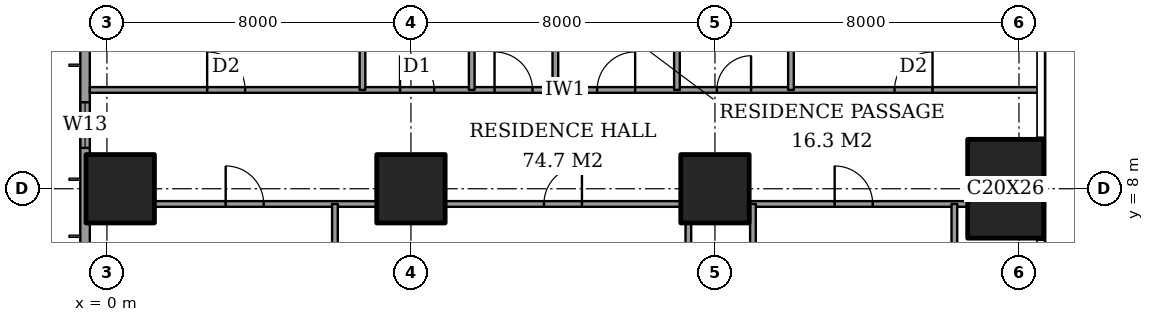
"""IFC4 building model, lengths in metres.
Left out: names, types, materials, properties, quantities, classifications, styles, units other than length and angle.
Written with IfcOpenShell. Run it as: python <this file> out.ifc"""

import sys

from ifc_helpers import new_model, si_unit, direction, frame, frame_2d, origin, origin_2d, place, context, subcontext, project, spatial, rectangle, extrude, element, fill, save


model = new_model("IFC4")
c1 = context("Model", 3, precision=1e-05, world=origin(), true_north=direction((0.0, 1.0)))
c2 = subcontext(c1, "Body", "Model", "MODEL_VIEW")
j1 = project(units=[si_unit("LENGTHUNIT", "METRE"), si_unit("PLANEANGLEUNIT", "RADIAN")], contexts=[c1])
p1 = place(None, origin())
s1 = spatial("IfcSite", under=j1, at=p1, CompositionType="ELEMENT")
p2 = place(p1, origin())
s2 = spatial("IfcBuilding", under=s1, at=p2, CompositionType="ELEMENT")
p3 = place(p2, frame((0.0, 0.0, 189.4)))
s3 = spatial("IfcBuildingStorey", under=s2, at=p3, CompositionType="ELEMENT", Elevation=189.4)
for number, where, z_axis, x_axis in (
    (1, (0.35, 8.0, 0.0), (0.0, 0.0, 1.0), (1.0, 0.0, 0.0)),
    (2, (8.0, 8.0, 0.0), (0.0, 0.0, 1.0), (1.0, 0.0, 0.0)),
    (3, (16.0, 8.0, 0.0), (0.0, 0.0, 1.0), (1.0, 0.0, 0.0)),
):
    element("IfcColumn", number, at=place(p3, frame(where, z_axis=z_axis, x_axis=x_axis)), inside=s3, PredefinedType="COLUMN", context=c2, shape_type="SweptSolid", body=[
        extrude(rectangle(XDim=1.8, YDim=1.8, at=origin_2d()), origin(), (0.0, 0.0, 1.0), 3.6),
    ])
p4 = place(p3, frame((23.65, 8.0, 0.0), z_axis=(0.0, 0.0, 1.0), x_axis=(1.0, 0.0, 0.0)))
e4 = element("IfcColumn", 4, at=p4, inside=s3, PredefinedType="COLUMN", context=c2, shape_type="SweptSolid", body=[
    extrude(rectangle(XDim=2.0, YDim=2.6, at=origin_2d()), origin(), (0.0, 0.0, 1.0), 3.6),
])
p5 = place(p3, frame((-0.575, 44.825, 0.0), z_axis=(0.0, 0.0, 1.0), x_axis=(0.0, -1.0, 0.0)))
e5 = element("IfcWall", 5, at=p5, inside=s3, PredefinedType="SOLIDWALL", context=c2, shape_type="SweptSolid", body=[
    extrude(rectangle(XDim=41.65, YDim=0.25, at=frame_2d((20.825, 0.0))), origin(), (0.0, 0.0, 1.0), 3.6),
])
p6 = place(p5, frame((0.825, 0.0, 0.2)))
e6 = element("IfcOpeningElement", 6, at=p6, cuts=e5, PredefinedType="OPENING", context=c2, shape_type="SweptSolid", body=[
    extrude(rectangle(XDim=2.4, YDim=2.4, at=frame_2d((1.2, 1.2))), frame((0.0, 0.135, 0.0), z_axis=(0.0, -1.0, 0.0), x_axis=(1.0, 0.0, 0.0)), (0.0, 0.0, 1.0), 0.27),
])
p7 = place(p5, frame((6.05, 0.0, 0.2)))
e7 = element("IfcOpeningElement", 7, at=p7, cuts=e5, PredefinedType="OPENING", context=c2, shape_type="SweptSolid", body=[
    extrude(rectangle(XDim=1.2, YDim=2.4, at=frame_2d((0.6, 1.2))), frame((0.0, 0.135, 0.0), z_axis=(0.0, -1.0, 0.0), x_axis=(1.0, 0.0, 0.0)), (0.0, 0.0, 1.0), 0.27),
])
p8 = place(p5, frame((8.475, 0.0, 0.2)))
e8 = element("IfcOpeningElement", 8, at=p8, cuts=e5, PredefinedType="OPENING", context=c2, shape_type="SweptSolid", body=[
    extrude(rectangle(XDim=2.4, YDim=2.4, at=frame_2d((1.2, 1.2))), frame((0.0, 0.135, 0.0), z_axis=(0.0, -1.0, 0.0), x_axis=(1.0, 0.0, 0.0)), (0.0, 0.0, 1.0), 0.27),
])
p9 = place(p5, frame((15.625, 0.0, 0.2)))
e9 = element("IfcOpeningElement", 9, at=p9, cuts=e5, PredefinedType="OPENING", context=c2, shape_type="SweptSolid", body=[
    extrude(rectangle(XDim=2.4, YDim=2.4, at=frame_2d((1.2, 1.2))), frame((0.0, 0.135, 0.0), z_axis=(0.0, -1.0, 0.0), x_axis=(1.0, 0.0, 0.0)), (0.0, 0.0, 1.0), 0.27),
])
p10 = place(p5, frame((23.625, 0.0, 0.2)))
e10 = element("IfcOpeningElement", 10, at=p10, cuts=e5, PredefinedType="OPENING", context=c2, shape_type="SweptSolid", body=[
    extrude(rectangle(XDim=2.4, YDim=2.4, at=frame_2d((1.2, 1.2))), frame((0.0, 0.135, 0.0), z_axis=(0.0, -1.0, 0.0), x_axis=(1.0, 0.0, 0.0)), (0.0, 0.0, 1.0), 0.27),
])
p11 = place(p5, frame((30.775, 0.0, 0.2)))
e11 = element("IfcOpeningElement", 11, at=p11, cuts=e5, PredefinedType="OPENING", context=c2, shape_type="SweptSolid", body=[
    extrude(rectangle(XDim=2.4, YDim=2.4, at=frame_2d((1.2, 1.2))), frame((0.0, 0.135, 0.0), z_axis=(0.0, -1.0, 0.0), x_axis=(1.0, 0.0, 0.0)), (0.0, 0.0, 1.0), 0.27),
])
p12 = place(p5, frame((34.55, 0.0, 0.2)))
e12 = element("IfcOpeningElement", 12, at=p12, cuts=e5, PredefinedType="OPENING", context=c2, shape_type="SweptSolid", body=[
    extrude(rectangle(XDim=1.2, YDim=2.4, at=frame_2d((0.6, 1.2))), frame((0.0, 0.135, 0.0), z_axis=(0.0, -1.0, 0.0), x_axis=(1.0, 0.0, 0.0)), (0.0, 0.0, 1.0), 0.27),
])
p13 = place(p5, frame((38.425, 0.0, 0.2)))
e13 = element("IfcOpeningElement", 13, at=p13, cuts=e5, PredefinedType="OPENING", context=c2, shape_type="SweptSolid", body=[
    extrude(rectangle(XDim=2.4, YDim=2.4, at=frame_2d((1.2, 1.2))), frame((0.0, 0.135, 0.0), z_axis=(0.0, -1.0, 0.0), x_axis=(1.0, 0.0, 0.0)), (0.0, 0.0, 1.0), 0.27),
])
p14 = place(p3, frame((1.25, 7.6, 0.0), z_axis=(0.0, 0.0, 1.0), x_axis=(1.0, 0.0, 0.0)))
e14 = element("IfcWall", 14, at=p14, inside=s3, PredefinedType="PARTITIONING", context=c2, shape_type="SweptSolid", body=[
    extrude(rectangle(XDim=5.85, YDim=0.15, at=frame_2d((2.925, 0.0))), origin(), (0.0, 0.0, 1.0), 3.35),
])
p15 = place(p14, frame((1.875, 0.0, 0.0)))
e15 = element("IfcOpeningElement", 15, at=p15, cuts=e14, PredefinedType="OPENING", context=c2, shape_type="SweptSolid", body=[
    extrude(rectangle(XDim=1.0, YDim=2.1, at=frame_2d((0.5, 1.05))), frame((0.0, 0.085, 0.0), z_axis=(0.0, -1.0, 0.0), x_axis=(1.0, 0.0, 0.0)), (0.0, 0.0, 1.0), 0.17),
])
p16 = place(p3, frame((8.9, 7.6, 0.0), z_axis=(0.0, 0.0, 1.0), x_axis=(1.0, 0.0, 0.0)))
e16 = element("IfcWall", 16, at=p16, inside=s3, PredefinedType="PARTITIONING", context=c2, shape_type="SweptSolid", body=[
    extrude(rectangle(XDim=6.2, YDim=0.15, at=frame_2d((3.1, 0.0))), origin(), (0.0, 0.0, 1.0), 3.35),
])
p17 = place(p16, frame((2.6, 0.0, 0.0)))
e17 = element("IfcOpeningElement", 17, at=p17, cuts=e16, PredefinedType="OPENING", context=c2, shape_type="SweptSolid", body=[
    extrude(rectangle(XDim=1.0, YDim=2.1, at=frame_2d((0.5, 1.05))), frame((0.0, 0.085, 0.0), z_axis=(0.0, -1.0, 0.0), x_axis=(1.0, 0.0, 0.0)), (0.0, 0.0, 1.0), 0.17),
])
p18 = place(p3, frame((16.9, 7.6, 0.0), z_axis=(0.0, 0.0, 1.0), x_axis=(1.0, 0.0, 0.0)))
e18 = element("IfcWall", 18, at=p18, inside=s3, PredefinedType="PARTITIONING", context=c2, shape_type="SweptSolid", body=[
    extrude(rectangle(XDim=5.75, YDim=0.15, at=frame_2d((2.875, 0.0))), origin(), (0.0, 0.0, 1.0), 3.35),
])
p19 = place(p18, frame((2.25, 0.0, 0.0)))
e19 = element("IfcOpeningElement", 19, at=p19, cuts=e18, PredefinedType="OPENING", context=c2, shape_type="SweptSolid", body=[
    extrude(rectangle(XDim=1.0, YDim=2.1, at=frame_2d((0.5, 1.05))), frame((0.0, 0.085, 0.0), z_axis=(0.0, -1.0, 0.0), x_axis=(1.0, 0.0, 0.0)), (0.0, 0.0, 1.0), 0.17),
])
p20 = place(p3, frame((-0.45, 10.6, 0.0), z_axis=(0.0, 0.0, 1.0), x_axis=(1.0, 0.0, 0.0)))
e20 = element("IfcWall", 20, at=p20, inside=s3, PredefinedType="PARTITIONING", context=c2, shape_type="SweptSolid", body=[
    extrude(rectangle(XDim=25.011, YDim=0.15, at=frame_2d((12.505, 0.0))), origin(), (0.0, 0.0, 1.0), 3.35),
])
p21 = place(p20, frame((10.65, 0.0, 0.0)))
e21 = element("IfcOpeningElement", 21, at=p21, cuts=e20, PredefinedType="OPENING", context=c2, shape_type="SweptSolid", body=[
    extrude(rectangle(XDim=1.0, YDim=2.1, at=frame_2d((0.5, 1.05))), frame((0.0, 0.085, 0.0), z_axis=(0.0, -1.0, 0.0), x_axis=(1.0, 0.0, 0.0)), (0.0, 0.0, 1.0), 0.17),
])
p22 = place(p20, frame((3.087, 0.0, 0.0)))
e22 = element("IfcOpeningElement", 22, at=p22, cuts=e20, PredefinedType="OPENING", context=c2, shape_type="SweptSolid", body=[
    extrude(rectangle(XDim=1.0, YDim=2.1, at=frame_2d((0.5, 1.05))), frame((0.0, 0.085, 0.0), z_axis=(0.0, -1.0, 0.0), x_axis=(1.0, 0.0, 0.0)), (0.0, 0.0, 1.0), 0.17),
])
p23 = place(p20, frame((8.163, 0.0, 0.0)))
e23 = element("IfcOpeningElement", 23, at=p23, cuts=e20, PredefinedType="OPENING", context=c2, shape_type="SweptSolid", body=[
    extrude(rectangle(XDim=0.9, YDim=2.1, at=frame_2d((0.45, 1.05))), frame((0.0, 0.085, 0.0), z_axis=(0.0, -1.0, 0.0), x_axis=(1.0, 0.0, 0.0)), (0.0, 0.0, 1.0), 0.17),
])
p24 = place(p20, frame((13.35, 0.0, 0.0)))
e24 = element("IfcOpeningElement", 24, at=p24, cuts=e20, PredefinedType="OPENING", context=c2, shape_type="SweptSolid", body=[
    extrude(rectangle(XDim=1.0, YDim=2.1, at=frame_2d((0.5, 1.05))), frame((0.0, 0.085, 0.0), z_axis=(0.0, -1.0, 0.0), x_axis=(1.0, 0.0, 0.0)), (0.0, 0.0, 1.0), 0.17),
])
p25 = place(p20, frame((16.5, 0.0, 0.0)))
e25 = element("IfcOpeningElement", 25, at=p25, cuts=e20, PredefinedType="OPENING", context=c2, shape_type="SweptSolid", body=[
    extrude(rectangle(XDim=0.9, YDim=2.1, at=frame_2d((0.45, 1.05))), frame((0.0, 0.085, 0.0), z_axis=(0.0, -1.0, 0.0), x_axis=(1.0, 0.0, 0.0)), (0.0, 0.0, 1.0), 0.17),
])
p26 = place(p20, frame((21.175, 0.0, 0.0)))
e26 = element("IfcOpeningElement", 26, at=p26, cuts=e20, PredefinedType="OPENING", context=c2, shape_type="SweptSolid", body=[
    extrude(rectangle(XDim=1.0, YDim=2.1, at=frame_2d((0.5, 1.05))), frame((0.0, 0.085, 0.0), z_axis=(0.0, -1.0, 0.0), x_axis=(1.0, 0.0, 0.0)), (0.0, 0.0, 1.0), 0.17),
])
p27 = place(p3, frame((6.0, -0.45, 0.0), z_axis=(0.0, 0.0, 1.0), x_axis=(0.0, 1.0, 0.0)))
e27 = element("IfcWall", 27, at=p27, inside=s3, PredefinedType="PARTITIONING", context=c2, shape_type="SweptSolid", body=[
    extrude(rectangle(XDim=8.05, YDim=0.15, at=frame_2d((4.025, 0.0))), origin(), (0.0, 0.0, 1.0), 3.35),
])
p28 = place(p3, frame((6.725, 10.6, 0.0), z_axis=(0.0, 0.0, 1.0), x_axis=(0.0, 1.0, 0.0)))
e28 = element("IfcWall", 28, at=p28, inside=s3, PredefinedType="PARTITIONING", context=c2, shape_type="SweptSolid", body=[
    extrude(rectangle(XDim=4.2, YDim=0.15, at=frame_2d((2.1, 0.0))), origin(), (0.0, 0.0, 1.0), 3.35),
])
p29 = place(p3, frame((9.6, 10.6, 0.0), z_axis=(0.0, 0.0, 1.0), x_axis=(0.0, 1.0, 0.0)))
e29 = element("IfcWall", 29, at=p29, inside=s3, PredefinedType="PARTITIONING", context=c2, shape_type="SweptSolid", body=[
    extrude(rectangle(XDim=11.0, YDim=0.15, at=frame_2d((5.5, 0.0))), origin(), (0.0, 0.0, 1.0), 3.35),
])
p30 = place(p29, frame((8.7, 0.0, 0.0)))
e30 = element("IfcOpeningElement", 30, at=p30, cuts=e29, PredefinedType="OPENING", context=c2, shape_type="SweptSolid", body=[
    extrude(rectangle(XDim=1.0, YDim=2.1, at=frame_2d((0.5, 1.05))), frame((0.0, 0.085, 0.0), z_axis=(0.0, -1.0, 0.0), x_axis=(1.0, 0.0, 0.0)), (0.0, 0.0, 1.0), 0.17),
])
p31 = place(p3, frame((11.8, 10.6, 0.0), z_axis=(0.0, 0.0, 1.0), x_axis=(0.0, 1.0, 0.0)))
e31 = element("IfcWall", 31, at=p31, inside=s3, PredefinedType="PARTITIONING", context=c2, shape_type="SweptSolid", body=[
    extrude(rectangle(XDim=7.4, YDim=0.15, at=frame_2d((3.7, 0.0))), origin(), (0.0, 0.0, 1.0), 3.35),
])
p32 = place(p3, frame((15.0, 10.6, 0.0), z_axis=(0.0, 0.0, 1.0), x_axis=(0.0, 1.0, 0.0)))
e32 = element("IfcWall", 32, at=p32, inside=s3, PredefinedType="PARTITIONING", context=c2, shape_type="SweptSolid", body=[
    extrude(rectangle(XDim=4.2, YDim=0.15, at=frame_2d((2.1, 0.0))), origin(), (0.0, 0.0, 1.0), 3.35),
])
p33 = place(p3, frame((15.3, 1.25, 0.0), z_axis=(0.0, 0.0, 1.0), x_axis=(0.0, 1.0, 0.0)))
e33 = element("IfcWall", 33, at=p33, inside=s3, PredefinedType="PARTITIONING", context=c2, shape_type="SweptSolid", body=[
    extrude(rectangle(XDim=5.85, YDim=0.15, at=frame_2d((2.925, 0.0))), origin(), (0.0, 0.0, 1.0), 3.35),
])
p34 = place(p33, frame((2.475, 0.0, 0.0)))
e34 = element("IfcOpeningElement", 34, at=p34, cuts=e33, PredefinedType="OPENING", context=c2, shape_type="SweptSolid", body=[
    extrude(rectangle(XDim=0.9, YDim=2.1, at=frame_2d((0.45, 1.05))), frame((0.0, 0.085, 0.0), z_axis=(0.0, -1.0, 0.0), x_axis=(1.0, 0.0, 0.0)), (0.0, 0.0, 1.0), 0.17),
])
p35 = place(p3, frame((17.0, -0.45, 0.0), z_axis=(0.0, 0.0, 1.0), x_axis=(0.0, 1.0, 0.0)))
e35 = element("IfcWall", 35, at=p35, inside=s3, PredefinedType="PARTITIONING", context=c2, shape_type="SweptSolid", body=[
    extrude(rectangle(XDim=8.05, YDim=0.15, at=frame_2d((4.025, 0.0))), origin(), (0.0, 0.0, 1.0), 3.35),
])
p36 = place(p3, frame((18.0, 10.6, 0.0), z_axis=(0.0, 0.0, 1.0), x_axis=(0.0, 1.0, 0.0)))
e36 = element("IfcWall", 36, at=p36, inside=s3, PredefinedType="PARTITIONING", context=c2, shape_type="SweptSolid", body=[
    extrude(rectangle(XDim=7.4, YDim=0.15, at=frame_2d((3.7, 0.0))), origin(), (0.0, 0.0, 1.0), 3.35),
])
p37 = place(p3, frame((22.3, -0.45, 0.0), z_axis=(0.0, 0.0, 1.0), x_axis=(0.0, 1.0, 0.0)))
e37 = element("IfcWall", 37, at=p37, inside=s3, PredefinedType="PARTITIONING", context=c2, shape_type="SweptSolid", body=[
    extrude(rectangle(XDim=8.05, YDim=0.15, at=frame_2d((4.025, 0.0))), origin(), (0.0, 0.0, 1.0), 3.35),
])
p38 = place(p37, frame((3.575, 0.0, 0.0)))
e38 = element("IfcOpeningElement", 38, at=p38, cuts=e37, PredefinedType="OPENING", context=c2, shape_type="SweptSolid", body=[
    extrude(rectangle(XDim=0.9, YDim=2.1, at=frame_2d((0.45, 1.05))), frame((0.0, 0.085, 0.0), z_axis=(0.0, -1.0, 0.0), x_axis=(1.0, 0.0, 0.0)), (0.0, 0.0, 1.0), 0.17),
])
p39 = place(p12, origin())
e39 = element("IfcWindow", 39, at=p39, inside=s3, PartitioningType="SINGLE_PANEL", PredefinedType="WINDOW", context=c2, shape_type="SweptSolid", body=[
    extrude(rectangle(XDim=1.2, YDim=2.4, at=frame_2d((0.6, 1.2))), frame((0.0, 0.03, 0.0), z_axis=(0.0, -1.0, 0.0), x_axis=(1.0, 0.0, 0.0)), (0.0, 0.0, 1.0), 0.06),
])
fill(e12, e39)
p40 = place(p15, origin())
e40 = element("IfcDoor", 40, at=p40, inside=s3, OperationType="SINGLE_SWING_RIGHT", PredefinedType="DOOR", context=c2, shape_type="SweptSolid", body=[
    extrude(rectangle(XDim=1.0, YDim=2.1, at=frame_2d((0.5, 1.05))), frame((0.0, 0.025, 0.0), z_axis=(0.0, -1.0, 0.0), x_axis=(1.0, 0.0, 0.0)), (0.0, 0.0, 1.0), 0.05),
])
fill(e15, e40)
p41 = place(p17, origin())
e41 = element("IfcDoor", 41, at=p41, inside=s3, OperationType="SINGLE_SWING_LEFT", PredefinedType="DOOR", context=c2, shape_type="SweptSolid", body=[
    extrude(rectangle(XDim=1.0, YDim=2.1, at=frame_2d((0.5, 1.05))), frame((0.0, 0.025, 0.0), z_axis=(0.0, -1.0, 0.0), x_axis=(1.0, 0.0, 0.0)), (0.0, 0.0, 1.0), 0.05),
])
fill(e17, e41)
p42 = place(p19, origin())
e42 = element("IfcDoor", 42, at=p42, inside=s3, OperationType="SINGLE_SWING_RIGHT", PredefinedType="DOOR", context=c2, shape_type="SweptSolid", body=[
    extrude(rectangle(XDim=1.0, YDim=2.1, at=frame_2d((0.5, 1.05))), frame((0.0, 0.025, 0.0), z_axis=(0.0, -1.0, 0.0), x_axis=(1.0, 0.0, 0.0)), (0.0, 0.0, 1.0), 0.05),
])
fill(e19, e42)
p43 = place(p21, origin())
e43 = element("IfcDoor", 43, at=p43, inside=s3, OperationType="SINGLE_SWING_RIGHT", PredefinedType="DOOR", context=c2, shape_type="SweptSolid", body=[
    extrude(rectangle(XDim=1.0, YDim=2.1, at=frame_2d((0.5, 1.05))), frame((0.0, 0.025, 0.0), z_axis=(0.0, -1.0, 0.0), x_axis=(1.0, 0.0, 0.0)), (0.0, 0.0, 1.0), 0.05),
])
fill(e21, e43)
p44 = place(p22, origin())
e44 = element("IfcDoor", 44, at=p44, inside=s3, OperationType="SINGLE_SWING_RIGHT", PredefinedType="DOOR", context=c2, shape_type="SweptSolid", body=[
    extrude(rectangle(XDim=1.0, YDim=2.1, at=frame_2d((0.5, 1.05))), frame((0.0, 0.025, 0.0), z_axis=(0.0, -1.0, 0.0), x_axis=(1.0, 0.0, 0.0)), (0.0, 0.0, 1.0), 0.05),
])
fill(e22, e44)
p45 = place(p23, origin())
e45 = element("IfcDoor", 45, at=p45, inside=s3, OperationType="SINGLE_SWING_RIGHT", PredefinedType="DOOR", context=c2, shape_type="SweptSolid", body=[
    extrude(rectangle(XDim=0.9, YDim=2.1, at=frame_2d((0.45, 1.05))), frame((0.0, 0.025, 0.0), z_axis=(0.0, -1.0, 0.0), x_axis=(1.0, 0.0, 0.0)), (0.0, 0.0, 1.0), 0.05),
])
fill(e23, e45)
p46 = place(p24, origin())
e46 = element("IfcDoor", 46, at=p46, inside=s3, OperationType="SINGLE_SWING_LEFT", PredefinedType="DOOR", context=c2, shape_type="SweptSolid", body=[
    extrude(rectangle(XDim=1.0, YDim=2.1, at=frame_2d((0.5, 1.05))), frame((0.0, 0.025, 0.0), z_axis=(0.0, -1.0, 0.0), x_axis=(1.0, 0.0, 0.0)), (0.0, 0.0, 1.0), 0.05),
])
fill(e24, e46)
p47 = place(p25, origin())
e47 = element("IfcDoor", 47, at=p47, inside=s3, OperationType="SINGLE_SWING_LEFT", PredefinedType="DOOR", context=c2, shape_type="SweptSolid", body=[
    extrude(rectangle(XDim=0.9, YDim=2.1, at=frame_2d((0.45, 1.05))), frame((0.0, 0.025, 0.0), z_axis=(0.0, -1.0, 0.0), x_axis=(1.0, 0.0, 0.0)), (0.0, 0.0, 1.0), 0.05),
])
fill(e25, e47)
p48 = place(p26, origin())
e48 = element("IfcDoor", 48, at=p48, inside=s3, OperationType="SINGLE_SWING_LEFT", PredefinedType="DOOR", context=c2, shape_type="SweptSolid", body=[
    extrude(rectangle(XDim=1.0, YDim=2.1, at=frame_2d((0.5, 1.05))), frame((0.0, 0.025, 0.0), z_axis=(0.0, -1.0, 0.0), x_axis=(1.0, 0.0, 0.0)), (0.0, 0.0, 1.0), 0.05),
])
fill(e26, e48)
save(model, sys.argv[1])
